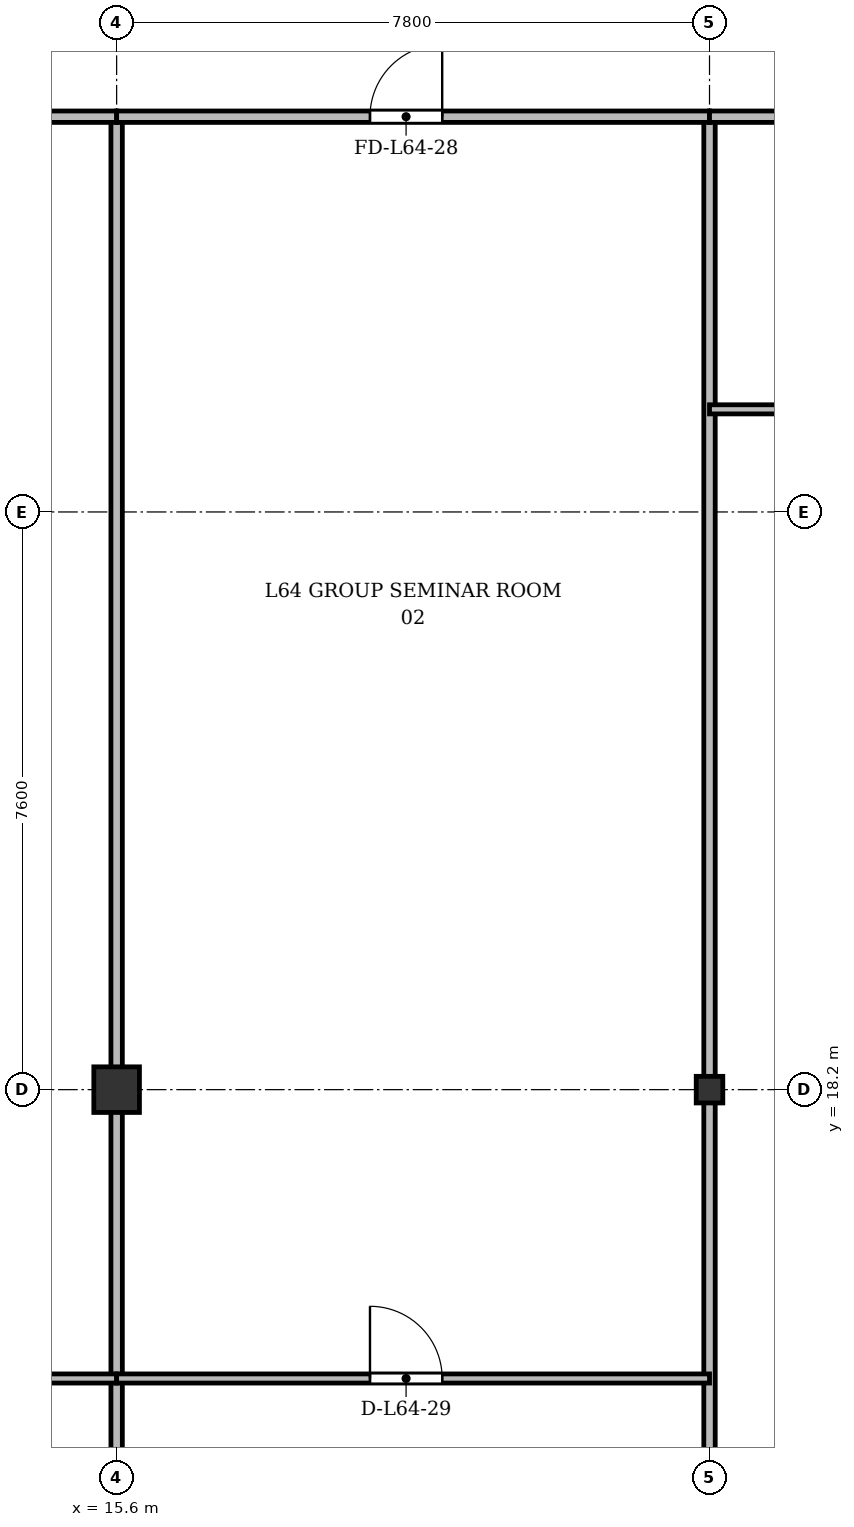
"""IFC4 building model, lengths in metres.
Left out: names, types, materials, properties, quantities, classifications, styles, units other than length and angle.
Written with IfcOpenShell. Run it as: python <this file> out.ifc"""

import sys

from ifc_helpers import new_model, si_unit, direction, frame, frame_2d, origin, origin_2d, place, context, subcontext, project, spatial, rectangle, i_section, extrude, source, transform, mapped, element, fill, save


model = new_model("IFC4")
c1 = context("Model", 3, precision=1e-05, world=origin(), true_north=direction((0.0, 1.0)))
c2 = subcontext(c1, "Body", "Model", "MODEL_VIEW")
j1 = project(units=[si_unit("LENGTHUNIT", "METRE"), si_unit("PLANEANGLEUNIT", "RADIAN")], contexts=[c1])
p1 = place(None, origin())
s1 = spatial("IfcSite", under=j1, at=p1, CompositionType="ELEMENT")
p2 = place(p1, origin())
s2 = spatial("IfcBuilding", under=s1, at=p2, CompositionType="ELEMENT")
p3 = place(p2, frame((0.0, 0.0, 248.7)))
s3 = spatial("IfcBuildingStorey", under=s2, at=p3, CompositionType="ELEMENT", Elevation=248.7)
m1 = source(origin(), c2, "Body", "SweptSolid", [
    extrude(rectangle(XDim=0.6, YDim=0.6, at=origin_2d()), origin(), (0.0, 0.0, 1.0), 3.6),
])
p4 = place(p3, frame((15.6, 18.2, 0.0), z_axis=(0.0, 0.0, 1.0), x_axis=(1.0, 0.0, 0.0)))
e1 = element("IfcColumn", 1, at=p4, inside=s3, PredefinedType="COLUMN", context=c2, shape_type="MappedRepresentation", body=[
    mapped(m1, transform((0.0, 0.0, 0.0), x_axis=(1.0, 0.0, 0.0), y_axis=(0.0, 1.0, 0.0), z_axis=(0.0, 0.0, 1.0), scale=1.0)),
])
m2 = source(origin(), c2, "Body", "SweptSolid", [
    extrude(i_section(OverallWidth=0.35, OverallDepth=0.35, WebThickness=0.018, FlangeThickness=0.028, at=origin_2d()), origin(), (0.0, 0.0, 1.0), 3.6),
])
p5 = place(p3, frame((23.4, 18.2, 0.0), z_axis=(0.0, 0.0, 1.0), x_axis=(1.0, 0.0, 0.0)))
e2 = element("IfcColumn", 2, at=p5, inside=s3, PredefinedType="COLUMN", context=c2, shape_type="MappedRepresentation", body=[
    mapped(m2, transform((0.0, 0.0, 0.0), x_axis=(1.0, 0.0, 0.0), y_axis=(0.0, 1.0, 0.0), z_axis=(0.0, 0.0, 1.0), scale=1.0)),
])
for number, where, z_axis, x_axis in (
    (3, (15.6, 3.725, 0.0), (0.0, 0.0, 1.0), (0.0, 1.0, 0.0)),
    (4, (23.4, 3.725, 0.0), (0.0, 0.0, 1.0), (0.0, 1.0, 0.0)),
):
    element("IfcWall", number, at=place(p3, frame(where, z_axis=z_axis, x_axis=x_axis)), inside=s3, PredefinedType="PARTITIONING", context=c2, shape_type="SweptSolid", body=[
        extrude(rectangle(XDim=27.275, YDim=0.15, at=frame_2d((13.637, 0.0))), origin(), (0.0, 0.0, 1.0), 2.87),
    ])
p6 = place(p3, frame((8.425, 31.0, 0.0), z_axis=(0.0, 0.0, 1.0), x_axis=(1.0, 0.0, 0.0)))
e5 = element("IfcWall", 5, at=p6, inside=s3, PredefinedType="PARTITIONING", context=c2, shape_type="SweptSolid", body=[
    extrude(rectangle(XDim=7.175, YDim=0.15, at=frame_2d((3.587, 0.0))), origin(), (0.0, 0.0, 1.0), 2.87),
])
p7 = place(p6, frame((3.112, 0.0, 0.0)))
e6 = element("IfcOpeningElement", 6, at=p7, cuts=e5, PredefinedType="OPENING", context=c2, shape_type="SweptSolid", body=[
    extrude(rectangle(XDim=0.95, YDim=2.15, at=frame_2d((0.475, 1.075))), frame((0.0, 0.085, 0.0), z_axis=(0.0, -1.0, 0.0), x_axis=(1.0, 0.0, 0.0)), (0.0, 0.0, 1.0), 0.17),
])
p8 = place(p3, frame((8.425, 14.4, 0.0), z_axis=(0.0, 0.0, 1.0), x_axis=(1.0, 0.0, 0.0)))
e7 = element("IfcWall", 7, at=p8, inside=s3, PredefinedType="PARTITIONING", context=c2, shape_type="SweptSolid", body=[
    extrude(rectangle(XDim=7.175, YDim=0.12, at=frame_2d((3.587, 0.0))), origin(), (0.0, 0.0, 1.0), 2.87),
])
p9 = place(p8, frame((3.112, 0.0, 0.0)))
e8 = element("IfcOpeningElement", 8, at=p9, cuts=e7, PredefinedType="OPENING", context=c2, shape_type="SweptSolid", body=[
    extrude(rectangle(XDim=0.95, YDim=2.15, at=frame_2d((0.475, 1.075))), frame((0.0, 0.07, 0.0), z_axis=(0.0, -1.0, 0.0), x_axis=(1.0, 0.0, 0.0)), (0.0, 0.0, 1.0), 0.14),
])
p10 = place(p3, frame((15.6, 31.0, 0.0), z_axis=(0.0, 0.0, 1.0), x_axis=(1.0, 0.0, 0.0)))
e9 = element("IfcWall", 9, at=p10, inside=s3, PredefinedType="PARTITIONING", context=c2, shape_type="SweptSolid", body=[
    extrude(rectangle(XDim=7.8, YDim=0.15, at=frame_2d((3.9, 0.0))), origin(), (0.0, 0.0, 1.0), 2.87),
])
p11 = place(p10, frame((3.333, 0.0, 0.0)))
e10 = element("IfcOpeningElement", 10, at=p11, cuts=e9, PredefinedType="OPENING", context=c2, shape_type="SweptSolid", body=[
    extrude(rectangle(XDim=0.95, YDim=2.15, at=frame_2d((0.475, 1.075))), frame((0.0, 0.085, 0.0), z_axis=(0.0, -1.0, 0.0), x_axis=(1.0, 0.0, 0.0)), (0.0, 0.0, 1.0), 0.17),
])
p12 = place(p3, frame((15.6, 14.4, 0.0), z_axis=(0.0, 0.0, 1.0), x_axis=(1.0, 0.0, 0.0)))
e11 = element("IfcWall", 11, at=p12, inside=s3, PredefinedType="PARTITIONING", context=c2, shape_type="SweptSolid", body=[
    extrude(rectangle(XDim=7.8, YDim=0.12, at=frame_2d((3.9, 0.0))), origin(), (0.0, 0.0, 1.0), 2.87),
])
p13 = place(p12, frame((3.333, 0.0, 0.0)))
e12 = element("IfcOpeningElement", 12, at=p13, cuts=e11, PredefinedType="OPENING", context=c2, shape_type="SweptSolid", body=[
    extrude(rectangle(XDim=0.95, YDim=2.15, at=frame_2d((0.475, 1.075))), frame((0.0, 0.07, 0.0), z_axis=(0.0, -1.0, 0.0), x_axis=(1.0, 0.0, 0.0)), (0.0, 0.0, 1.0), 0.14),
])
p14 = place(p3, frame((23.4, 31.0, 0.0), z_axis=(0.0, 0.0, 1.0), x_axis=(1.0, 0.0, 0.0)))
e13 = element("IfcWall", 13, at=p14, inside=s3, PredefinedType="PARTITIONING", context=c2, shape_type="SweptSolid", body=[
    extrude(rectangle(XDim=7.2, YDim=0.15, at=frame_2d((3.6, 0.0))), origin(), (0.0, 0.0, 1.0), 2.87),
])
p15 = place(p14, frame((3.125, 0.0, 0.0)))
e14 = element("IfcOpeningElement", 14, at=p15, cuts=e13, PredefinedType="OPENING", context=c2, shape_type="SweptSolid", body=[
    extrude(rectangle(XDim=0.95, YDim=2.15, at=frame_2d((0.475, 1.075))), frame((0.0, 0.085, 0.0), z_axis=(0.0, -1.0, 0.0), x_axis=(1.0, 0.0, 0.0)), (0.0, 0.0, 1.0), 0.17),
])
p16 = place(p3, frame((23.4, 27.15, 0.0), z_axis=(0.0, 0.0, 1.0), x_axis=(1.0, 0.0, 0.0)))
e15 = element("IfcWall", 15, at=p16, inside=s3, PredefinedType="PARTITIONING", context=c2, shape_type="SweptSolid", body=[
    extrude(rectangle(XDim=7.2, YDim=0.12, at=frame_2d((3.6, 0.0))), origin(), (0.0, 0.0, 1.0), 2.87),
])
p17 = place(p16, frame((3.125, 0.0, 0.0)))
e16 = element("IfcOpeningElement", 16, at=p17, cuts=e15, PredefinedType="OPENING", context=c2, shape_type="SweptSolid", body=[
    extrude(rectangle(XDim=0.95, YDim=2.15, at=frame_2d((0.475, 1.075))), frame((0.0, 0.07, 0.0), z_axis=(0.0, -1.0, 0.0), x_axis=(1.0, 0.0, 0.0)), (0.0, 0.0, 1.0), 0.14),
])
m3 = source(origin(), c2, "Body", "SweptSolid", [
    extrude(rectangle(XDim=0.95, YDim=2.15, at=frame_2d((0.475, 1.075))), frame((0.0, 0.025, 0.0), z_axis=(0.0, -1.0, 0.0), x_axis=(1.0, 0.0, 0.0)), (0.0, 0.0, 1.0), 0.05),
])
p18 = place(p11, origin())
e17 = element("IfcDoor", 17, at=p18, inside=s3, OperationType="SINGLE_SWING_RIGHT", PredefinedType="DOOR", context=c2, shape_type="MappedRepresentation", body=[
    mapped(m3, transform((0.0, 0.0, 0.0), x_axis=(1.0, 0.0, 0.0), y_axis=(0.0, 1.0, 0.0), z_axis=(0.0, 0.0, 1.0), scale=1.0)),
])
fill(e10, e17)
p19 = place(p13, origin())
e18 = element("IfcDoor", 18, at=p19, inside=s3, OperationType="SINGLE_SWING_LEFT", PredefinedType="DOOR", context=c2, shape_type="MappedRepresentation", body=[
    mapped(m3, transform((0.0, 0.0, 0.0), x_axis=(1.0, 0.0, 0.0), y_axis=(0.0, 1.0, 0.0), z_axis=(0.0, 0.0, 1.0), scale=1.0)),
])
fill(e12, e18)
save(model, sys.argv[1])
